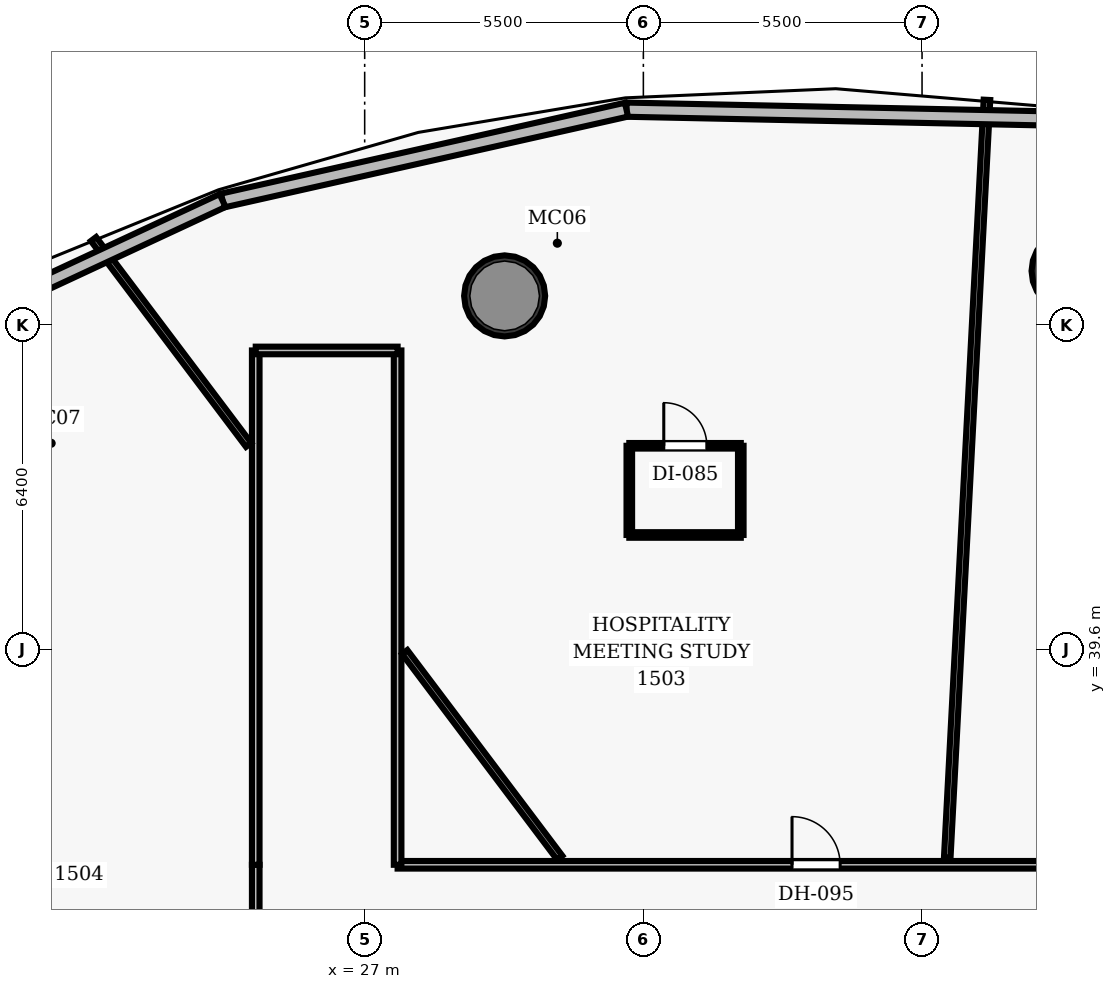
"""IFC4 building model, lengths in metres.
Left out: names, types, materials, properties, quantities, classifications, styles, units other than length and angle.
Written with IfcOpenShell. Run it as: python <this file> out.ifc"""

import sys

from ifc_helpers import new_model, si_unit, direction, frame, frame_2d, origin, origin_2d, place, context, subcontext, project, spatial, rectangle, hollow_circle, extrude, element, fill, save


model = new_model("IFC4")
c1 = context("Model", 3, precision=1e-05, world=origin(), true_north=direction((0.0, 1.0)))
c2 = subcontext(c1, "Body", "Model", "MODEL_VIEW")
j1 = project(units=[si_unit("LENGTHUNIT", "METRE"), si_unit("PLANEANGLEUNIT", "RADIAN")], contexts=[c1])
p1 = place(None, origin())
s1 = spatial("IfcSite", under=j1, at=p1, CompositionType="ELEMENT")
p2 = place(p1, origin())
s2 = spatial("IfcBuilding", under=s1, at=p2, CompositionType="ELEMENT")
p3 = place(p2, frame((0.0, 0.0, 69.4)))
s3 = spatial("IfcBuildingStorey", under=s2, at=p3, CompositionType="ELEMENT", Elevation=69.4)
for number, where, z_axis, x_axis in (
    (1, (40.961, 47.069, 0.0), (0.0, 0.0, 1.0), (1.0, 0.0, 0.0)),
    (2, (29.762, 46.577, 0.0), (0.0, 0.0, 1.0), (1.0, 0.0, 0.0)),
):
    element("IfcColumn", number, at=place(p3, frame(where, z_axis=z_axis, x_axis=x_axis)), inside=s3, PredefinedType="COLUMN", context=c2, shape_type="SweptSolid", body=[
        extrude(hollow_circle(Radius=0.8, WallThickness=0.06, at=origin_2d()), origin(), (0.0, 0.0, 1.0), 3.5),
    ])
p4 = place(p3, frame((27.65, 35.35, 0.0), z_axis=(0.0, 0.0, 1.0), x_axis=(1.0, 0.0, 0.0)))
e3 = element("IfcWall", 3, at=p4, inside=s3, PredefinedType="PARTITIONING", context=c2, shape_type="SweptSolid", body=[
    extrude(rectangle(XDim=23.5, YDim=0.15, at=frame_2d((11.75, 0.0))), origin(), (0.0, 0.0, 1.0), 2.6),
])
p5 = place(p4, frame((14.553, 0.0, 0.0)))
e4 = element("IfcOpeningElement", 4, at=p5, cuts=e3, PredefinedType="OPENING", context=c2, shape_type="SweptSolid", body=[
    extrude(rectangle(XDim=0.95, YDim=2.15, at=frame_2d((0.475, 1.075))), frame((0.0, 0.085, 0.0), z_axis=(0.0, -1.0, 0.0), x_axis=(1.0, 0.0, 0.0)), (0.0, 0.0, 1.0), 0.17),
])
p6 = place(p4, frame((7.784, 0.0, 0.0)))
e5 = element("IfcOpeningElement", 5, at=p6, cuts=e3, PredefinedType="OPENING", context=c2, shape_type="SweptSolid", body=[
    extrude(rectangle(XDim=0.95, YDim=2.15, at=frame_2d((0.475, 1.075))), frame((0.0, 0.085, 0.0), z_axis=(0.0, -1.0, 0.0), x_axis=(1.0, 0.0, 0.0)), (0.0, 0.0, 1.0), 0.17),
])
p7 = place(p3, frame((24.85, 19.45, 0.0), z_axis=(0.0, 0.0, 1.0), x_axis=(0.0, 1.0, 0.0)))
e6 = element("IfcWall", 6, at=p7, inside=s3, PredefinedType="PARTITIONING", context=c2, shape_type="SweptSolid", body=[
    extrude(rectangle(XDim=15.9, YDim=0.15, at=frame_2d((7.95, 0.0))), origin(), (0.0, 0.0, 1.0), 2.6),
])
p8 = place(p7, frame((10.488, 0.0, 0.0)))
e7 = element("IfcOpeningElement", 7, at=p8, cuts=e6, PredefinedType="OPENING", context=c2, shape_type="SweptSolid", body=[
    extrude(rectangle(XDim=0.95, YDim=2.15, at=frame_2d((0.475, 1.075))), frame((0.0, 0.085, 0.0), z_axis=(0.0, -1.0, 0.0), x_axis=(1.0, 0.0, 0.0)), (0.0, 0.0, 1.0), 0.17),
])
p9 = place(p7, frame((6.958, 0.0, 0.0)))
e8 = element("IfcOpeningElement", 8, at=p9, cuts=e6, PredefinedType="OPENING", context=c2, shape_type="SweptSolid", body=[
    extrude(rectangle(XDim=0.95, YDim=2.15, at=frame_2d((0.475, 1.075))), frame((0.0, 0.085, 0.0), z_axis=(0.0, -1.0, 0.0), x_axis=(1.0, 0.0, 0.0)), (0.0, 0.0, 1.0), 0.17),
])
for number, where, z_axis, x_axis in (
    (9, (24.85, 35.35, 0.0), (0.0, 0.0, 1.0), (0.0, 1.0, 0.0)),
    (10, (27.65, 35.35, 0.0), (0.0, 0.0, 1.0), (0.0, 1.0, 0.0)),
):
    element("IfcWall", number, at=place(p3, frame(where, z_axis=z_axis, x_axis=x_axis)), inside=s3, PredefinedType="PARTITIONING", context=c2, shape_type="SweptSolid", body=[
        extrude(rectangle(XDim=10.15, YDim=0.15, at=frame_2d((5.075, 0.0))), origin(), (0.0, 0.0, 1.0), 2.6),
    ])
p10 = place(p3, frame((24.85, 45.5, 0.0), z_axis=(0.0, 0.0, 1.0), x_axis=(1.0, 0.0, 0.0)))
e11 = element("IfcWall", 11, at=p10, inside=s3, PredefinedType="PARTITIONING", context=c2, shape_type="SweptSolid", body=[
    extrude(rectangle(XDim=2.8, YDim=0.15, at=frame_2d((1.4, 0.0))), origin(), (0.0, 0.0, 1.0), 2.6),
])
p11 = place(p3, frame((38.497, 35.49, 0.0), z_axis=(0.0, 0.0, 1.0), x_axis=(0.052328670598, 0.998629916552, 0.0)))
e12 = element("IfcWall", 12, at=p11, inside=s3, PredefinedType="PARTITIONING", context=c2, shape_type="SweptSolid", body=[
    extrude(rectangle(XDim=14.976, YDim=0.13, at=frame_2d((7.488, 0.0))), origin(), (0.0, 0.0, 1.0), 2.6),
])
p12 = place(p3, frame((30.849, 35.49, 0.0), z_axis=(0.0, 0.0, 1.0), x_axis=(-0.601827595562, 0.798626035902, 0.0)))
e13 = element("IfcWall", 13, at=p12, inside=s3, PredefinedType="PARTITIONING", context=c2, shape_type="SweptSolid", body=[
    extrude(rectangle(XDim=5.083, YDim=0.13, at=frame_2d((2.541, 0.0))), origin(), (0.0, 0.0, 1.0), 2.6),
])
p13 = place(p3, frame((24.71, 43.636, 0.0), z_axis=(0.0, 0.0, 1.0), x_axis=(-0.601818300029, 0.798633040733, 0.0)))
e14 = element("IfcWall", 14, at=p13, inside=s3, PredefinedType="PARTITIONING", context=c2, shape_type="SweptSolid", body=[
    extrude(rectangle(XDim=5.087, YDim=0.13, at=frame_2d((2.543, 0.0))), origin(), (0.0, 0.0, 1.0), 2.6),
])
p14 = place(p3, frame((32.223, 41.859, 0.0), z_axis=(0.0, 0.0, 1.0), x_axis=(1.0, 0.0, 0.0)))
e15 = element("IfcWall", 15, at=p14, inside=s3, PredefinedType="PARTITIONING", context=c2, shape_type="SweptSolid", body=[
    extrude(rectangle(XDim=2.2, YDim=0.11, at=frame_2d((1.1, 0.0))), origin(), (0.0, 0.0, 1.0), 2.6),
])
p15 = place(p3, frame((32.223, 43.619, 0.0), z_axis=(0.0, 0.0, 1.0), x_axis=(1.0, 0.0, 0.0)))
e16 = element("IfcWall", 16, at=p15, inside=s3, PredefinedType="PARTITIONING", context=c2, shape_type="SweptSolid", body=[
    extrude(rectangle(XDim=2.2, YDim=0.11, at=frame_2d((1.1, 0.0))), origin(), (0.0, 0.0, 1.0), 2.6),
])
p16 = place(p15, frame((0.68, 0.0, 0.0)))
e17 = element("IfcOpeningElement", 17, at=p16, cuts=e16, PredefinedType="OPENING", context=c2, shape_type="SweptSolid", body=[
    extrude(rectangle(XDim=0.85, YDim=2.1, at=frame_2d((0.425, 1.05))), frame((0.0, 0.065, 0.0), z_axis=(0.0, -1.0, 0.0), x_axis=(1.0, 0.0, 0.0)), (0.0, 0.0, 1.0), 0.13),
])
for number, where, z_axis, x_axis in (
    (18, (32.223, 41.859, 0.0), (0.0, 0.0, 1.0), (0.0, 1.0, 0.0)),
    (19, (34.423, 41.859, 0.0), (0.0, 0.0, 1.0), (0.0, 1.0, 0.0)),
):
    element("IfcWall", number, at=place(p3, frame(where, z_axis=z_axis, x_axis=x_axis)), inside=s3, PredefinedType="PARTITIONING", context=c2, shape_type="SweptSolid", body=[
        extrude(rectangle(XDim=1.76, YDim=0.11, at=frame_2d((0.88, 0.0))), origin(), (0.0, 0.0, 1.0), 2.6),
    ])
p17 = place(p3, frame((32.167, 50.252, 0.0), z_axis=(0.0, 0.0, 1.0), x_axis=(0.999783120984, -0.020825729179, 0.0)))
e20 = element("IfcWall", 20, at=p17, inside=s3, PredefinedType="SOLIDWALL", context=c2, shape_type="SweptSolid", body=[
    extrude(rectangle(XDim=8.241, YDim=0.28, at=frame_2d((4.121, 0.0))), origin(), (0.0, 0.0, 1.0), 3.25),
])
p18 = place(p3, frame((24.196, 48.459, 0.0), z_axis=(0.0, 0.0, 1.0), x_axis=(0.975627030245, 0.219435407023, 0.0)))
e21 = element("IfcWall", 21, at=p18, inside=s3, PredefinedType="SOLIDWALL", context=c2, shape_type="SweptSolid", body=[
    extrude(rectangle(XDim=8.171, YDim=0.28, at=frame_2d((4.085, 0.0))), origin(), (0.0, 0.0, 1.0), 3.25),
])
p19 = place(p3, frame((17.084, 45.147, 0.0), z_axis=(0.0, 0.0, 1.0), x_axis=(0.90655249664, 0.422093083142, 0.0)))
e22 = element("IfcWall", 22, at=p19, inside=s3, PredefinedType="SOLIDWALL", context=c2, shape_type="SweptSolid", body=[
    extrude(rectangle(XDim=7.845, YDim=0.28, at=frame_2d((3.922, 0.0))), origin(), (0.0, 0.0, 1.0), 3.25),
])
p20 = place(p6, origin())
e23 = element("IfcDoor", 23, at=p20, inside=s3, OperationType="SINGLE_SWING_LEFT", PredefinedType="DOOR", context=c2, shape_type="SweptSolid", body=[
    extrude(rectangle(XDim=0.95, YDim=2.15, at=frame_2d((0.475, 1.075))), frame((0.0, 0.025, 0.0), z_axis=(0.0, -1.0, 0.0), x_axis=(1.0, 0.0, 0.0)), (0.0, 0.0, 1.0), 0.05),
])
fill(e5, e23)
p21 = place(p16, origin())
e24 = element("IfcDoor", 24, at=p21, inside=s3, OperationType="SINGLE_SWING_LEFT", PredefinedType="DOOR", context=c2, shape_type="SweptSolid", body=[
    extrude(rectangle(XDim=0.85, YDim=2.1, at=frame_2d((0.425, 1.05))), frame((0.0, 0.025, 0.0), z_axis=(0.0, -1.0, 0.0), x_axis=(1.0, 0.0, 0.0)), (0.0, 0.0, 1.0), 0.05),
])
fill(e17, e24)
save(model, sys.argv[1])
